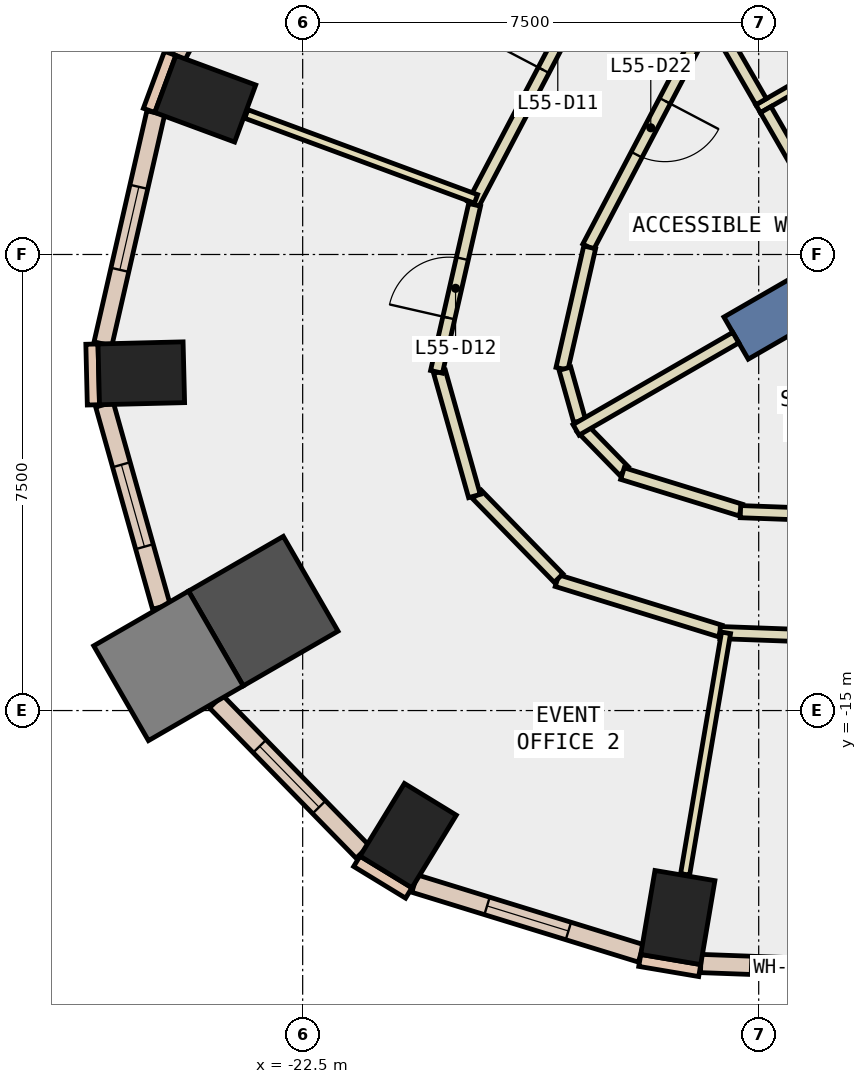
"""IFC4 building model, lengths in metres.
Left out: names, types, materials, properties, quantities, classifications, styles, units other than length and angle.
Written with IfcOpenShell. Run it as: python <this file> out.ifc"""

import sys

from ifc_helpers import new_model, si_unit, direction, frame, frame_2d, origin, origin_2d, place, context, subcontext, project, spatial, rectangle, extrude, element, fill, save


model = new_model("IFC4")
c1 = context("Model", 3, precision=1e-05, world=origin(), true_north=direction((0.0, 1.0)))
c2 = subcontext(c1, "Body", "Model", "MODEL_VIEW")
j1 = project(units=[si_unit("LENGTHUNIT", "METRE"), si_unit("PLANEANGLEUNIT", "RADIAN")], contexts=[c1])
p1 = place(None, origin())
s1 = spatial("IfcSite", under=j1, at=p1, CompositionType="ELEMENT")
p2 = place(p1, origin())
s2 = spatial("IfcBuilding", under=s1, at=p2, CompositionType="ELEMENT")
p3 = place(p2, frame((0.0, 0.0, 245.0)))
s3 = spatial("IfcBuildingStorey", under=s2, at=p3, CompositionType="ELEMENT", Elevation=245.0)
for number, where, z_axis, x_axis in (
    (1, (-16.33, -18.404, -0.34), (0.0, 0.0, 1.0), (-0.986, 0.167, 0.0)),
    (2, (-24.102, -4.939, -0.34), (0.0, 0.0, 1.0), (0.347, 0.938, 0.0)),
    (3, (-25.154, -9.454, -0.34), (0.0, 0.0, 1.0), (-0.025, 1.0, 0.0)),
):
    element("IfcColumn", number, at=place(p3, frame(where, z_axis=z_axis, x_axis=x_axis)), inside=s3, PredefinedType="COLUMN", context=c2, shape_type="SweptSolid", body=[
        extrude(rectangle(XDim=1.0, YDim=1.4, at=origin_2d()), origin(), (0.0, 0.0, 1.0), 3.6),
    ])
p4 = place(p3, frame((-23.148, -13.365, -0.34), z_axis=(0.0, 0.0, 1.0), x_axis=(0.866025403784, 0.5, 0.0)))
e4 = element("IfcColumn", 4, at=p4, inside=s3, PredefinedType="COLUMN", context=c2, shape_type="SweptSolid", body=[
    extrude(rectangle(XDim=1.8, YDim=1.8, at=origin_2d()), origin(), (0.0, 0.0, 1.0), 3.6),
])
p5 = place(p3, frame((-20.765, -17.057, -0.34), z_axis=(0.0, 0.0, 1.0), x_axis=(-0.853341581839, 0.521352227103, 0.0)))
e5 = element("IfcColumn", 5, at=p5, inside=s3, PredefinedType="COLUMN", context=c2, shape_type="SweptSolid", body=[
    extrude(rectangle(XDim=1.0, YDim=1.4, at=origin_2d()), origin(), (0.0, 0.0, 1.0), 3.6),
])
p6 = place(p3, frame((-24.707, -14.265, -0.34), z_axis=(0.0, 0.0, 1.0), x_axis=(0.866025403784, 0.5, 0.0)))
e6 = element("IfcColumn", 6, at=p6, inside=s3, PredefinedType="COLUMN", context=c2, shape_type="SweptSolid", body=[
    extrude(rectangle(XDim=1.8, YDim=1.8, at=origin_2d()), origin(), (0.0, 0.0, 1.0), 3.6),
])
p7 = place(p3, frame((-7.578, -4.375, -0.34), z_axis=(0.0, 0.0, 1.0), x_axis=(-0.866024315419, -0.5000018851, 0.0)))
e7 = element("IfcWall", 7, at=p7, inside=s3, PredefinedType="SHEAR", context=c2, shape_type="SweptSolid", body=[
    extrude(rectangle(XDim=9.0, YDim=0.8, at=frame_2d((4.5, 0.0))), origin(), (0.0, 0.0, 1.0), 3.6),
])
p8 = place(p3, frame((-24.679, -4.193, 0.0), z_axis=(0.0, 0.0, 1.0), x_axis=(-0.346892928577, -0.937904737222, 0.0)))
e8 = element("IfcWall", 8, at=p8, inside=s3, PredefinedType="STANDARD", context=c2, shape_type="SweptSolid", body=[
    extrude(rectangle(XDim=1.0, YDim=0.2, at=frame_2d((0.5, 0.0))), origin(), (0.0, 0.0, 1.0), 3.26),
])
p9 = place(p3, frame((-16.956, -19.109, 0.0), z_axis=(0.0, 0.0, 1.0), x_axis=(0.985961725342, -0.166971483074, 0.0)))
e9 = element("IfcWall", 9, at=p9, inside=s3, PredefinedType="STANDARD", context=c2, shape_type="SweptSolid", body=[
    extrude(rectangle(XDim=1.0, YDim=0.2, at=frame_2d((0.5, 0.0))), origin(), (0.0, 0.0, 1.0), 3.26),
])
p10 = place(p3, frame((-25.966, -8.974, 0.0), z_axis=(0.0, 0.0, 1.0), x_axis=(0.024192379573, -0.999707321555, 0.0)))
e10 = element("IfcWall", 10, at=p10, inside=s3, PredefinedType="STANDARD", context=c2, shape_type="SweptSolid", body=[
    extrude(rectangle(XDim=0.999, YDim=0.2, at=frame_2d((0.5, 0.0))), origin(), (0.0, 0.0, 1.0), 3.26),
])
p11 = place(p3, frame((-21.609, -17.479, 0.0), z_axis=(0.0, 0.0, 1.0), x_axis=(0.853679739553, -0.520798331677, 0.0)))
e11 = element("IfcWall", 11, at=p11, inside=s3, PredefinedType="STANDARD", context=c2, shape_type="SweptSolid", body=[
    extrude(rectangle(XDim=1.0, YDim=0.2, at=frame_2d((0.5, 0.0))), origin(), (0.0, 0.0, 1.0), 3.26),
])
p12 = place(p3, frame((-15.952, -19.16, 0.0), z_axis=(0.0, 0.0, 1.0), x_axis=(0.999331753125, -0.036551979363, 0.0)))
e12 = element("IfcWall", 12, at=p12, inside=s3, PredefinedType="STANDARD", context=c2, shape_type="SweptSolid", body=[
    extrude(rectangle(XDim=7.661, YDim=0.3, at=frame_2d((3.831, 0.0))), origin(), (0.0, 0.0, 1.0), 3.26),
])
p13 = place(p12, frame((0.815, 0.0, 0.9)))
e13 = element("IfcOpeningElement", 13, at=p13, cuts=e12, PredefinedType="OPENING", context=c2, shape_type="SweptSolid", body=[
    extrude(rectangle(XDim=2.2, YDim=2.0, at=frame_2d((1.1, 1.0))), frame((0.0, 0.16, 0.0), z_axis=(0.0, -1.0, 0.0), x_axis=(1.0, 0.0, 0.0)), (0.0, 0.0, 1.0), 0.32),
])
p14 = place(p12, frame((4.646, 0.0, 0.9)))
e14 = element("IfcOpeningElement", 14, at=p14, cuts=e12, PredefinedType="OPENING", context=c2, shape_type="SweptSolid", body=[
    extrude(rectangle(XDim=2.2, YDim=2.0, at=frame_2d((1.1, 1.0))), frame((0.0, 0.16, 0.0), z_axis=(0.0, -1.0, 0.0), x_axis=(1.0, 0.0, 0.0)), (0.0, 0.0, 1.0), 0.32),
])
p15 = place(p3, frame((-21.978, 0.698, 0.0), z_axis=(0.0, 0.0, 1.0), x_axis=(-0.465228032148, -0.885190871001, 0.0)))
e15 = element("IfcWall", 15, at=p15, inside=s3, PredefinedType="STANDARD", context=c2, shape_type="SweptSolid", body=[
    extrude(rectangle(XDim=5.572, YDim=0.3, at=frame_2d((2.786, 0.0))), origin(), (0.0, 0.0, 1.0), 3.26),
])
p16 = place(p15, frame((0.693, 0.0, 0.9)))
e16 = element("IfcOpeningElement", 16, at=p16, cuts=e15, PredefinedType="OPENING", context=c2, shape_type="SweptSolid", body=[
    extrude(rectangle(XDim=1.4, YDim=2.0, at=frame_2d((0.7, 1.0))), frame((0.0, 0.16, 0.0), z_axis=(0.0, -1.0, 0.0), x_axis=(1.0, 0.0, 0.0)), (0.0, 0.0, 1.0), 0.32),
])
p17 = place(p15, frame((3.479, 0.0, 0.9)))
e17 = element("IfcOpeningElement", 17, at=p17, cuts=e15, PredefinedType="OPENING", context=c2, shape_type="SweptSolid", body=[
    extrude(rectangle(XDim=1.4, YDim=2.0, at=frame_2d((0.7, 1.0))), frame((0.0, 0.16, 0.0), z_axis=(0.0, -1.0, 0.0), x_axis=(1.0, 0.0, 0.0)), (0.0, 0.0, 1.0), 0.32),
])
p18 = place(p3, frame((-24.916, -5.17, 0.0), z_axis=(0.0, 0.0, 1.0), x_axis=(-0.222901327396, -0.974841011778, 0.0)))
e18 = element("IfcWall", 18, at=p18, inside=s3, PredefinedType="STANDARD", context=c2, shape_type="SweptSolid", body=[
    extrude(rectangle(XDim=3.898, YDim=0.3, at=frame_2d((1.949, 0.0))), origin(), (0.0, 0.0, 1.0), 3.26),
])
p19 = place(p18, frame((1.249, 0.0, 0.9)))
e19 = element("IfcOpeningElement", 19, at=p19, cuts=e18, PredefinedType="OPENING", context=c2, shape_type="SweptSolid", body=[
    extrude(rectangle(XDim=1.4, YDim=2.0, at=frame_2d((0.7, 1.0))), frame((0.0, 0.16, 0.0), z_axis=(0.0, -1.0, 0.0), x_axis=(1.0, 0.0, 0.0)), (0.0, 0.0, 1.0), 0.32),
])
p20 = place(p3, frame((-25.76, -9.968, 0.0), z_axis=(0.0, 0.0, 1.0), x_axis=(0.270837632743, -0.962625044703, 0.0)))
e20 = element("IfcWall", 20, at=p20, inside=s3, PredefinedType="STANDARD", context=c2, shape_type="SweptSolid", body=[
    extrude(rectangle(XDim=3.456, YDim=0.3, at=frame_2d((1.728, 0.0))), origin(), (0.0, 0.0, 1.0), 3.26),
])
p21 = place(p20, frame((1.028, 0.0, 0.9)))
e21 = element("IfcOpeningElement", 21, at=p21, cuts=e20, PredefinedType="OPENING", context=c2, shape_type="SweptSolid", body=[
    extrude(rectangle(XDim=1.4, YDim=2.0, at=frame_2d((0.7, 1.0))), frame((0.0, 0.16, 0.0), z_axis=(0.0, -1.0, 0.0), x_axis=(1.0, 0.0, 0.0)), (0.0, 0.0, 1.0), 0.32),
])
p22 = place(p3, frame((-23.925, -14.852, 0.0), z_axis=(0.0, 0.0, 1.0), x_axis=(0.698394514831, -0.715713002294, 0.0)))
e22 = element("IfcWall", 22, at=p22, inside=s3, PredefinedType="STANDARD", context=c2, shape_type="SweptSolid", body=[
    extrude(rectangle(XDim=3.454, YDim=0.3, at=frame_2d((1.727, 0.0))), origin(), (0.0, 0.0, 1.0), 3.26),
])
p23 = place(p22, frame((1.027, 0.0, 0.9)))
e23 = element("IfcOpeningElement", 23, at=p23, cuts=e22, PredefinedType="OPENING", context=c2, shape_type="SweptSolid", body=[
    extrude(rectangle(XDim=1.4, YDim=2.0, at=frame_2d((0.7, 1.0))), frame((0.0, 0.16, 0.0), z_axis=(0.0, -1.0, 0.0), x_axis=(1.0, 0.0, 0.0)), (0.0, 0.0, 1.0), 0.32),
])
p24 = place(p3, frame((-20.661, -17.845, 0.0), z_axis=(0.0, 0.0, 1.0), x_axis=(0.955646189569, -0.2945171648, 0.0)))
e24 = element("IfcWall", 24, at=p24, inside=s3, PredefinedType="STANDARD", context=c2, shape_type="SweptSolid", body=[
    extrude(rectangle(XDim=3.898, YDim=0.3, at=frame_2d((1.949, 0.0))), origin(), (0.0, 0.0, 1.0), 3.26),
])
p25 = place(p24, frame((1.249, 0.0, 0.9)))
e25 = element("IfcOpeningElement", 25, at=p25, cuts=e24, PredefinedType="OPENING", context=c2, shape_type="SweptSolid", body=[
    extrude(rectangle(XDim=1.4, YDim=2.0, at=frame_2d((0.7, 1.0))), frame((0.0, 0.16, 0.0), z_axis=(0.0, -1.0, 0.0), x_axis=(1.0, 0.0, 0.0)), (0.0, 0.0, 1.0), 0.32),
])
p26 = place(p3, frame((-15.746, -3.458, 0.0), z_axis=(0.0, 0.0, 1.0), x_axis=(-0.465179971699, -0.885216128372, 0.0)))
e26 = element("IfcWall", 26, at=p26, inside=s3, PredefinedType="PARTITIONING", context=c2, shape_type="SweptSolid", body=[
    extrude(rectangle(XDim=4.424, YDim=0.2, at=frame_2d((2.212, 0.0))), origin(), (0.0, 0.0, 1.0), 3.26),
])
p27 = place(p26, frame((1.712, 0.0, 0.0)))
e27 = element("IfcOpeningElement", 27, at=p27, cuts=e26, PredefinedType="OPENING", context=c2, shape_type="SweptSolid", body=[
    extrude(rectangle(XDim=1.0, YDim=2.1, at=frame_2d((0.5, 1.05))), frame((0.0, 0.11, 0.0), z_axis=(0.0, -1.0, 0.0), x_axis=(1.0, 0.0, 0.0)), (0.0, 0.0, 1.0), 0.22),
])
p28 = place(p3, frame((-17.78, -7.383, 0.0), z_axis=(0.0, 0.0, 1.0), x_axis=(-0.222760041204, -0.974873306662, 0.0)))
e28 = element("IfcWall", 28, at=p28, inside=s3, PredefinedType="PARTITIONING", context=c2, shape_type="SweptSolid", body=[
    extrude(rectangle(XDim=2.047, YDim=0.2, at=frame_2d((1.024, 0.0))), origin(), (0.0, 0.0, 1.0), 3.26),
])
p29 = place(p3, frame((-18.187, -9.378, 0.0), z_axis=(0.0, 0.0, 1.0), x_axis=(0.270785141481, -0.962639811743, 0.0)))
e29 = element("IfcWall", 29, at=p29, inside=s3, PredefinedType="PARTITIONING", context=c2, shape_type="SweptSolid", body=[
    extrude(rectangle(XDim=0.894, YDim=0.2, at=frame_2d((0.447, 0.0))), origin(), (0.0, 0.0, 1.0), 3.26),
])
p30 = place(p3, frame((-17.915, -10.344, 0.0), z_axis=(0.0, 0.0, 1.0), x_axis=(0.698527813511, -0.715582904877, 0.0)))
e30 = element("IfcWall", 30, at=p30, inside=s3, PredefinedType="PARTITIONING", context=c2, shape_type="SweptSolid", body=[
    extrude(rectangle(XDim=1.002, YDim=0.2, at=frame_2d((0.501, 0.0))), origin(), (0.0, 0.0, 1.0), 3.26),
])
p31 = place(p3, frame((-17.241, -11.103, 0.0), z_axis=(0.0, 0.0, 1.0), x_axis=(0.95563113363, -0.294566013716, 0.0)))
e31 = element("IfcWall", 31, at=p31, inside=s3, PredefinedType="PARTITIONING", context=c2, shape_type="SweptSolid", body=[
    extrude(rectangle(XDim=2.036, YDim=0.2, at=frame_2d((1.018, 0.0))), origin(), (0.0, 0.0, 1.0), 3.26),
])
p32 = place(p3, frame((-15.3, -11.729, 0.0), z_axis=(0.0, 0.0, 1.0), x_axis=(0.999326350165, -0.036699398722, 0.0)))
e32 = element("IfcWall", 32, at=p32, inside=s3, PredefinedType="PARTITIONING", context=c2, shape_type="SweptSolid", body=[
    extrude(rectangle(XDim=4.251, YDim=0.2, at=frame_2d((2.125, 0.0))), origin(), (0.0, 0.0, 1.0), 3.26),
])
p33 = place(p32, frame((1.7, 0.0, 0.0)))
e33 = element("IfcOpeningElement", 33, at=p33, cuts=e32, PredefinedType="OPENING", context=c2, shape_type="SweptSolid", body=[
    extrude(rectangle(XDim=1.0, YDim=2.1, at=frame_2d((0.5, 1.05))), frame((0.0, 0.11, 0.0), z_axis=(0.0, -1.0, 0.0), x_axis=(1.0, 0.0, 0.0)), (0.0, 0.0, 1.0), 0.22),
])
p34 = place(p3, frame((-19.696, -6.675, 0.0), z_axis=(0.0, 0.0, 1.0), x_axis=(0.465165163774, 0.88522390976, 0.0)))
e34 = element("IfcWall", 34, at=p34, inside=s3, PredefinedType="PARTITIONING", context=c2, shape_type="SweptSolid", body=[
    extrude(rectangle(XDim=5.835, YDim=0.2, at=frame_2d((2.917, 0.0))), origin(), (0.0, 0.0, 1.0), 3.26),
])
p35 = place(p34, frame((2.492, 0.0, 0.0)))
e35 = element("IfcOpeningElement", 35, at=p35, cuts=e34, PredefinedType="OPENING", context=c2, shape_type="SweptSolid", body=[
    extrude(rectangle(XDim=1.0, YDim=2.1, at=frame_2d((0.5, 1.05))), frame((0.0, 0.11, 0.0), z_axis=(0.0, -1.0, 0.0), x_axis=(1.0, 0.0, 0.0)), (0.0, 0.0, 1.0), 0.22),
])
p36 = place(p3, frame((-15.632, -13.692, 0.0), z_axis=(0.0, 0.0, 1.0), x_axis=(-0.955600342663, 0.294665887239, 0.0)))
e36 = element("IfcWall", 36, at=p36, inside=s3, PredefinedType="PARTITIONING", context=c2, shape_type="SweptSolid", body=[
    extrude(rectangle(XDim=2.81, YDim=0.2, at=frame_2d((1.405, 0.0))), origin(), (0.0, 0.0, 1.0), 3.26),
])
p37 = place(p3, frame((-18.291, -12.822, 0.0), z_axis=(0.0, 0.0, 1.0), x_axis=(-0.698477855606, 0.715631668687, 0.0)))
e37 = element("IfcWall", 37, at=p37, inside=s3, PredefinedType="PARTITIONING", context=c2, shape_type="SweptSolid", body=[
    extrude(rectangle(XDim=1.921, YDim=0.2, at=frame_2d((0.961, 0.0))), origin(), (0.0, 0.0, 1.0), 3.26),
])
p38 = place(p3, frame((-19.675, -11.472, 0.0), z_axis=(0.0, 0.0, 1.0), x_axis=(-0.270905475888, 0.962605954238, 0.0)))
e38 = element("IfcWall", 38, at=p38, inside=s3, PredefinedType="PARTITIONING", context=c2, shape_type="SweptSolid", body=[
    extrude(rectangle(XDim=2.122, YDim=0.2, at=frame_2d((1.061, 0.0))), origin(), (0.0, 0.0, 1.0), 3.26),
])
p39 = place(p3, frame((-20.299, -9.43, 0.0), z_axis=(0.0, 0.0, 1.0), x_axis=(0.222523624687, 0.974927298036, 0.0)))
e39 = element("IfcWall", 39, at=p39, inside=s3, PredefinedType="PARTITIONING", context=c2, shape_type="SweptSolid", body=[
    extrude(rectangle(XDim=2.817, YDim=0.2, at=frame_2d((1.409, 0.0))), origin(), (0.0, 0.0, 1.0), 3.26),
])
p40 = place(p39, frame((0.909, 0.0, 0.0)))
e40 = element("IfcOpeningElement", 40, at=p40, cuts=e39, PredefinedType="OPENING", context=c2, shape_type="SweptSolid", body=[
    extrude(rectangle(XDim=1.0, YDim=2.1, at=frame_2d((0.5, 1.05))), frame((0.0, 0.11, 0.0), z_axis=(0.0, -1.0, 0.0), x_axis=(1.0, 0.0, 0.0)), (0.0, 0.0, 1.0), 0.22),
])
p41 = place(p3, frame((-7.7, -14.008, 0.0), z_axis=(0.0, 0.0, 1.0), x_axis=(-0.99933282306, 0.036522715615, 0.0)))
e41 = element("IfcWall", 41, at=p41, inside=s3, PredefinedType="PARTITIONING", context=c2, shape_type="SweptSolid", body=[
    extrude(rectangle(XDim=7.941, YDim=0.2, at=frame_2d((3.971, 0.0))), origin(), (0.0, 0.0, 1.0), 3.26),
])
p42 = place(p41, frame((3.471, 0.0, 0.0)))
e42 = element("IfcOpeningElement", 42, at=p42, cuts=e41, PredefinedType="OPENING", context=c2, shape_type="SweptSolid", body=[
    extrude(rectangle(XDim=1.0, YDim=2.1, at=frame_2d((0.5, 1.05))), frame((0.0, 0.11, 0.0), z_axis=(0.0, -1.0, 0.0), x_axis=(1.0, 0.0, 0.0)), (0.0, 0.0, 1.0), 0.22),
])
p43 = place(p3, frame((-10.506, -2.503, 0.0), z_axis=(0.0, 0.0, 1.0), x_axis=(-0.866044872465, -0.49996627774, 0.0)))
e43 = element("IfcWall", 43, at=p43, inside=s3, PredefinedType="PARTITIONING", context=c2, shape_type="SweptSolid", body=[
    extrude(rectangle(XDim=5.2, YDim=0.15, at=frame_2d((2.6, 0.0))), origin(), (0.0, 0.0, 1.0), 3.26),
])
p44 = place(p3, frame((-14.96, -4.988, 0.0), z_axis=(0.0, 0.0, 1.0), x_axis=(-0.500175017317, 0.865924333907, 0.0)))
e44 = element("IfcWall", 44, at=p44, inside=s3, PredefinedType="PARTITIONING", context=c2, shape_type="SweptSolid", body=[
    extrude(rectangle(XDim=1.666, YDim=0.2, at=frame_2d((0.833, 0.0))), origin(), (0.0, 0.0, 1.0), 3.26),
])
p45 = place(p3, frame((-13.58, -7.379, 0.0), z_axis=(0.0, 0.0, 1.0), x_axis=(-0.499870876044, 0.866099940701, 0.0)))
e45 = element("IfcWall", 45, at=p45, inside=s3, PredefinedType="PARTITIONING", context=c2, shape_type="SweptSolid", body=[
    extrude(rectangle(XDim=2.611, YDim=0.2, at=frame_2d((1.305, 0.0))), origin(), (0.0, 0.0, 1.0), 3.26),
])
p46 = place(p3, frame((-15.377, -8.867, 0.0), z_axis=(0.0, 0.0, 1.0), x_axis=(-0.865965767548, -0.500103278768, 0.0)))
e46 = element("IfcWall", 46, at=p46, inside=s3, PredefinedType="PARTITIONING", context=c2, shape_type="SweptSolid", body=[
    extrude(rectangle(XDim=3.033, YDim=0.2, at=frame_2d((1.517, 0.0))), origin(), (0.0, 0.0, 1.0), 3.26),
])
p47 = place(p3, frame((-19.649, -6.586, 0.0), z_axis=(0.0, 0.0, 1.0), x_axis=(-0.937935790958, 0.346808956114, 0.0)))
e47 = element("IfcWall", 47, at=p47, inside=s3, PredefinedType="PARTITIONING", context=c2, shape_type="SweptSolid", body=[
    extrude(rectangle(XDim=4.028, YDim=0.15, at=frame_2d((2.014, 0.0))), origin(), (0.0, 0.0, 1.0), 3.26),
])
p48 = place(p3, frame((-15.537, -13.722, 0.0), z_axis=(0.0, 0.0, 1.0), x_axis=(-0.167012380144, -0.985954798598, 0.0)))
e48 = element("IfcWall", 48, at=p48, inside=s3, PredefinedType="PARTITIONING", context=c2, shape_type="SweptSolid", body=[
    extrude(rectangle(XDim=4.029, YDim=0.15, at=frame_2d((2.014, 0.0))), origin(), (0.0, 0.0, 1.0), 3.26),
])
p49 = place(p13, origin())
e49 = element("IfcWindow", 49, at=p49, inside=s3, PartitioningType="SINGLE_PANEL", PredefinedType="WINDOW", context=c2, shape_type="SweptSolid", body=[
    extrude(rectangle(XDim=2.2, YDim=2.0, at=frame_2d((1.1, 1.0))), frame((0.0, 0.03, 0.0), z_axis=(0.0, -1.0, 0.0), x_axis=(1.0, 0.0, 0.0)), (0.0, 0.0, 1.0), 0.06),
])
fill(e13, e49)
p50 = place(p19, origin())
e50 = element("IfcWindow", 50, at=p50, inside=s3, PartitioningType="SINGLE_PANEL", PredefinedType="WINDOW", context=c2, shape_type="SweptSolid", body=[
    extrude(rectangle(XDim=1.4, YDim=2.0, at=frame_2d((0.7, 1.0))), frame((0.0, 0.03, 0.0), z_axis=(0.0, -1.0, 0.0), x_axis=(1.0, 0.0, 0.0)), (0.0, 0.0, 1.0), 0.06),
])
fill(e19, e50)
p51 = place(p21, origin())
e51 = element("IfcWindow", 51, at=p51, inside=s3, PartitioningType="SINGLE_PANEL", PredefinedType="WINDOW", context=c2, shape_type="SweptSolid", body=[
    extrude(rectangle(XDim=1.4, YDim=2.0, at=frame_2d((0.7, 1.0))), frame((0.0, 0.03, 0.0), z_axis=(0.0, -1.0, 0.0), x_axis=(1.0, 0.0, 0.0)), (0.0, 0.0, 1.0), 0.06),
])
fill(e21, e51)
p52 = place(p23, origin())
e52 = element("IfcWindow", 52, at=p52, inside=s3, PartitioningType="SINGLE_PANEL", PredefinedType="WINDOW", context=c2, shape_type="SweptSolid", body=[
    extrude(rectangle(XDim=1.4, YDim=2.0, at=frame_2d((0.7, 1.0))), frame((0.0, 0.03, 0.0), z_axis=(0.0, -1.0, 0.0), x_axis=(1.0, 0.0, 0.0)), (0.0, 0.0, 1.0), 0.06),
])
fill(e23, e52)
p53 = place(p25, origin())
e53 = element("IfcWindow", 53, at=p53, inside=s3, PartitioningType="SINGLE_PANEL", PredefinedType="WINDOW", context=c2, shape_type="SweptSolid", body=[
    extrude(rectangle(XDim=1.4, YDim=2.0, at=frame_2d((0.7, 1.0))), frame((0.0, 0.03, 0.0), z_axis=(0.0, -1.0, 0.0), x_axis=(1.0, 0.0, 0.0)), (0.0, 0.0, 1.0), 0.06),
])
fill(e25, e53)
p54 = place(p35, origin())
e54 = element("IfcDoor", 54, at=p54, inside=s3, OperationType="SINGLE_SWING_LEFT", PredefinedType="DOOR", context=c2, shape_type="SweptSolid", body=[
    extrude(rectangle(XDim=1.0, YDim=2.1, at=frame_2d((0.5, 1.05))), frame((0.0, 0.025, 0.0), z_axis=(0.0, -1.0, 0.0), x_axis=(1.0, 0.0, 0.0)), (0.0, 0.0, 1.0), 0.05),
])
fill(e35, e54)
p55 = place(p40, origin())
e55 = element("IfcDoor", 55, at=p55, inside=s3, OperationType="SINGLE_SWING_LEFT", PredefinedType="DOOR", context=c2, shape_type="SweptSolid", body=[
    extrude(rectangle(XDim=1.0, YDim=2.1, at=frame_2d((0.5, 1.05))), frame((0.0, 0.025, 0.0), z_axis=(0.0, -1.0, 0.0), x_axis=(1.0, 0.0, 0.0)), (0.0, 0.0, 1.0), 0.05),
])
fill(e40, e55)
p56 = place(p27, origin())
e56 = element("IfcDoor", 56, at=p56, inside=s3, OperationType="SINGLE_SWING_LEFT", PredefinedType="DOOR", context=c2, shape_type="SweptSolid", body=[
    extrude(rectangle(XDim=1.0, YDim=2.1, at=frame_2d((0.5, 1.05))), frame((0.0, 0.025, 0.0), z_axis=(0.0, -1.0, 0.0), x_axis=(1.0, 0.0, 0.0)), (0.0, 0.0, 1.0), 0.05),
])
fill(e27, e56)
save(model, sys.argv[1])
